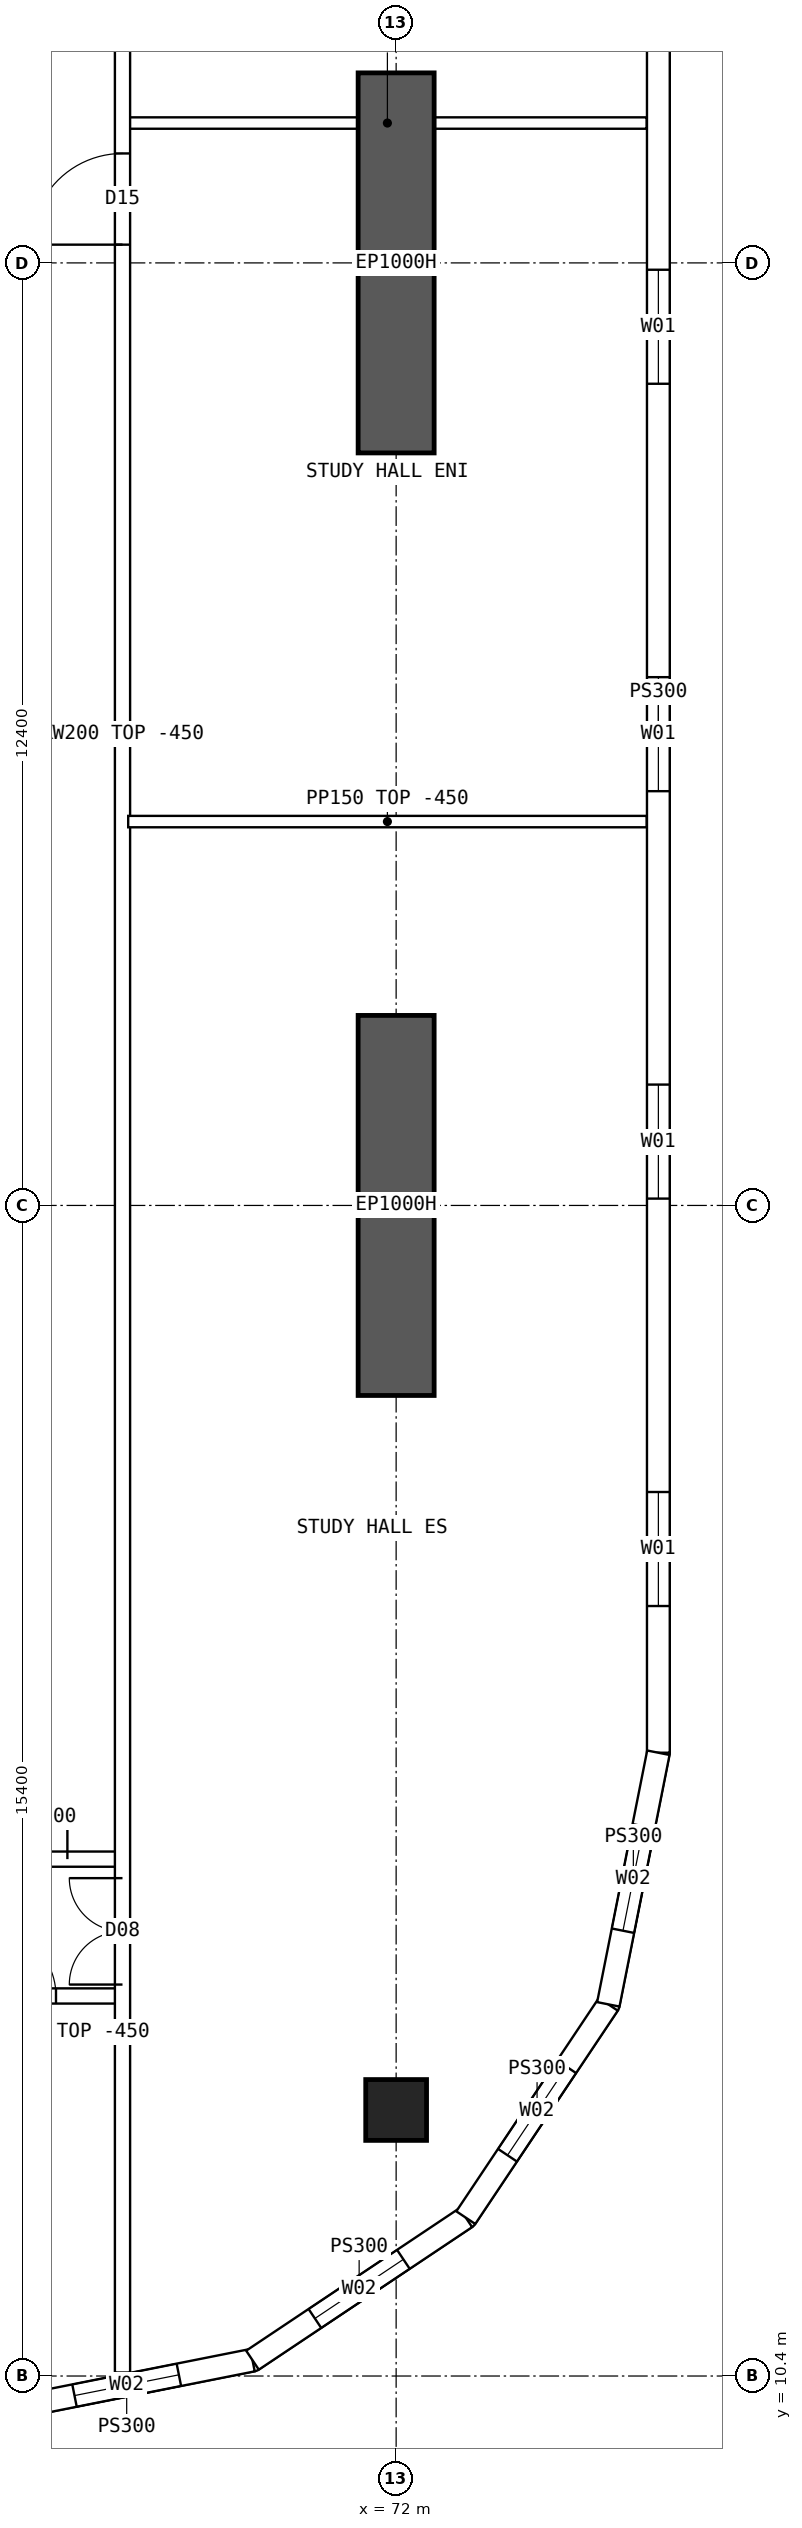
"""IFC4 building model, lengths in metres.
Left out: names, types, materials, properties, quantities, classifications, styles, units other than length and angle.
Written with IfcOpenShell. Run it as: python <this file> out.ifc"""

import sys

from ifc_helpers import new_model, si_unit, direction, frame, frame_2d, origin, origin_2d, place, context, subcontext, project, spatial, polyline, rectangle, hollow_rectangle, outline, extrude, element, fill, save


model = new_model("IFC4")
c1 = context("Model", 3, precision=1e-05, world=origin(), true_north=direction((0.0, 1.0)))
c2 = subcontext(c1, "Body", "Model", "MODEL_VIEW")
j1 = project(units=[si_unit("LENGTHUNIT", "METRE"), si_unit("PLANEANGLEUNIT", "RADIAN")], contexts=[c1])
p1 = place(None, origin())
s1 = spatial("IfcSite", under=j1, at=p1, CompositionType="ELEMENT")
p2 = place(p1, origin())
s2 = spatial("IfcBuilding", under=s1, at=p2, CompositionType="ELEMENT")
p3 = place(p2, frame((0.0, 0.0, 144.85)))
s3 = spatial("IfcBuildingStorey", under=s2, at=p3, CompositionType="ELEMENT", Elevation=144.85)
p4 = place(p3, frame((72.0, 13.9, 0.0), z_axis=(0.0, 0.0, 1.0), x_axis=(1.0, 0.0, 0.0)))
e1 = element("IfcColumn", 1, at=p4, inside=s3, PredefinedType="COLUMN", context=c2, shape_type="SweptSolid", body=[
    extrude(hollow_rectangle(XDim=0.8, YDim=0.8, WallThickness=0.08, at=origin_2d()), origin(), (0.0, 0.0, 1.0), 3.75),
])
for number, where, z_axis, x_axis in (
    (2, (72.0, 23.3, 0.0), (0.0, 0.0, 1.0), (0.0, 1.0, 0.0)),
    (3, (72.0, 35.7, 0.0), (0.0, 0.0, 1.0), (0.0, 1.0, 0.0)),
):
    element("IfcWall", number, at=place(p3, frame(where, z_axis=z_axis, x_axis=x_axis)), inside=s3, PredefinedType="SHEAR", context=c2, shape_type="SweptSolid", body=[
        extrude(rectangle(XDim=5.0, YDim=1.0, at=frame_2d((2.5, 0.0))), origin(), (0.0, 0.0, 1.0), 3.75),
    ])
p5 = place(p3, frame((75.45, 18.6, 0.0), z_axis=(0.0, 0.0, 1.0), x_axis=(0.0, 1.0, 0.0)))
e4 = element("IfcWall", 4, at=p5, inside=s3, PredefinedType="SOLIDWALL", context=c2, shape_type="SweptSolid", body=[
    extrude(outline(polyline([(-0.015, -0.15), (26.815, -0.15), (26.785, 0.15), (0.015, 0.15), (-0.015, -0.15)])), origin(), (0.0, 0.0, 1.0), 3.3),
])
p6 = place(p5, frame((1.93, 0.0, 0.9)))
e5 = element("IfcOpeningElement", 5, at=p6, cuts=e4, PredefinedType="OPENING", context=c2, shape_type="SweptSolid", body=[
    extrude(rectangle(XDim=1.5, YDim=2.0, at=frame_2d((0.75, 1.0))), frame((0.0, 0.16, 0.0), z_axis=(0.0, -1.0, 0.0), x_axis=(1.0, 0.0, 0.0)), (0.0, 0.0, 1.0), 0.32),
])
p7 = place(p5, frame((7.29, 0.0, 0.9)))
e6 = element("IfcOpeningElement", 6, at=p7, cuts=e4, PredefinedType="OPENING", context=c2, shape_type="SweptSolid", body=[
    extrude(rectangle(XDim=1.5, YDim=2.0, at=frame_2d((0.75, 1.0))), frame((0.0, 0.16, 0.0), z_axis=(0.0, -1.0, 0.0), x_axis=(1.0, 0.0, 0.0)), (0.0, 0.0, 1.0), 0.32),
])
p8 = place(p5, frame((12.65, 0.0, 0.9)))
e7 = element("IfcOpeningElement", 7, at=p8, cuts=e4, PredefinedType="OPENING", context=c2, shape_type="SweptSolid", body=[
    extrude(rectangle(XDim=1.5, YDim=2.0, at=frame_2d((0.75, 1.0))), frame((0.0, 0.16, 0.0), z_axis=(0.0, -1.0, 0.0), x_axis=(1.0, 0.0, 0.0)), (0.0, 0.0, 1.0), 0.32),
])
p9 = place(p5, frame((18.01, 0.0, 0.9)))
e8 = element("IfcOpeningElement", 8, at=p9, cuts=e4, PredefinedType="OPENING", context=c2, shape_type="SweptSolid", body=[
    extrude(rectangle(XDim=1.5, YDim=2.0, at=frame_2d((0.75, 1.0))), frame((0.0, 0.16, 0.0), z_axis=(0.0, -1.0, 0.0), x_axis=(1.0, 0.0, 0.0)), (0.0, 0.0, 1.0), 0.32),
])
p10 = place(p5, frame((23.37, 0.0, 0.9)))
e9 = element("IfcOpeningElement", 9, at=p10, cuts=e4, PredefinedType="OPENING", context=c2, shape_type="SweptSolid", body=[
    extrude(rectangle(XDim=1.5, YDim=2.0, at=frame_2d((0.75, 1.0))), frame((0.0, 0.16, 0.0), z_axis=(0.0, -1.0, 0.0), x_axis=(1.0, 0.0, 0.0)), (0.0, 0.0, 1.0), 0.32),
])
p11 = place(p3, frame((66.8, 9.95, 0.0), z_axis=(0.0, 0.0, 1.0), x_axis=(0.98078325777, 0.195100490205, 0.0)))
e10 = element("IfcWall", 10, at=p11, inside=s3, PredefinedType="SOLIDWALL", context=c2, shape_type="SweptSolid", body=[
    extrude(outline(polyline([(-0.03, -0.15), (3.405, -0.15), (3.345, 0.15), (0.03, 0.15), (-0.03, -0.15)])), origin(), (0.0, 0.0, 1.0), 3.3),
])
p12 = place(p11, frame((0.988, 0.0, 0.9)))
e11 = element("IfcOpeningElement", 11, at=p12, cuts=e10, PredefinedType="OPENING", context=c2, shape_type="SweptSolid", body=[
    extrude(rectangle(XDim=1.4, YDim=1.8, at=frame_2d((0.7, 0.9))), frame((0.0, 0.16, 0.0), z_axis=(0.0, -1.0, 0.0), x_axis=(1.0, 0.0, 0.0)), (0.0, 0.0, 1.0), 0.32),
])
p13 = place(p3, frame((70.11, 10.608, 0.0), z_axis=(0.0, 0.0, 1.0), x_axis=(0.831493450887, 0.555534554399, 0.0)))
e12 = element("IfcWall", 12, at=p13, inside=s3, PredefinedType="SOLIDWALL", context=c2, shape_type="SweptSolid", body=[
    extrude(outline(polyline([(-0.03, -0.15), (3.405, -0.15), (3.345, 0.15), (0.03, 0.15), (-0.03, -0.15)])), origin(), (0.0, 0.0, 1.0), 3.3),
])
p14 = place(p13, frame((0.988, 0.0, 0.9)))
e13 = element("IfcOpeningElement", 13, at=p14, cuts=e12, PredefinedType="OPENING", context=c2, shape_type="SweptSolid", body=[
    extrude(rectangle(XDim=1.4, YDim=1.8, at=frame_2d((0.7, 0.9))), frame((0.0, 0.16, 0.0), z_axis=(0.0, -1.0, 0.0), x_axis=(1.0, 0.0, 0.0)), (0.0, 0.0, 1.0), 0.32),
])
p15 = place(p3, frame((72.917, 12.483, 0.0), z_axis=(0.0, 0.0, 1.0), x_axis=(0.555534554399, 0.831493450887, 0.0)))
e14 = element("IfcWall", 14, at=p15, inside=s3, PredefinedType="SOLIDWALL", context=c2, shape_type="SweptSolid", body=[
    extrude(outline(polyline([(-0.03, -0.15), (3.405, -0.15), (3.345, 0.15), (0.03, 0.15), (-0.03, -0.15)])), origin(), (0.0, 0.0, 1.0), 3.3),
])
p16 = place(p15, frame((0.988, 0.0, 0.9)))
e15 = element("IfcOpeningElement", 15, at=p16, cuts=e14, PredefinedType="OPENING", context=c2, shape_type="SweptSolid", body=[
    extrude(rectangle(XDim=1.4, YDim=1.8, at=frame_2d((0.7, 0.9))), frame((0.0, 0.16, 0.0), z_axis=(0.0, -1.0, 0.0), x_axis=(1.0, 0.0, 0.0)), (0.0, 0.0, 1.0), 0.32),
])
p17 = place(p3, frame((74.792, 15.29, 0.0), z_axis=(0.0, 0.0, 1.0), x_axis=(0.19508664885, 0.980786011034, 0.0)))
e16 = element("IfcWall", 16, at=p17, inside=s3, PredefinedType="SOLIDWALL", context=c2, shape_type="SweptSolid", body=[
    extrude(outline(polyline([(-0.03, -0.15), (3.39, -0.15), (3.36, 0.15), (0.03, 0.15), (-0.03, -0.15)])), origin(), (0.0, 0.0, 1.0), 3.3),
])
p18 = place(p17, frame((0.988, 0.0, 0.9)))
e17 = element("IfcOpeningElement", 17, at=p18, cuts=e16, PredefinedType="OPENING", context=c2, shape_type="SweptSolid", body=[
    extrude(rectangle(XDim=1.4, YDim=1.8, at=frame_2d((0.7, 0.9))), frame((0.0, 0.16, 0.0), z_axis=(0.0, -1.0, 0.0), x_axis=(1.0, 0.0, 0.0)), (0.0, 0.0, 1.0), 0.32),
])
p19 = place(p3, frame((66.425, 15.4, 0.0), z_axis=(0.0, 0.0, 1.0), x_axis=(1.0, 0.0, 0.0)))
e18 = element("IfcWall", 18, at=p19, inside=s3, PredefinedType="SOLIDWALL", context=c2, shape_type="SweptSolid", body=[
    extrude(rectangle(XDim=1.975, YDim=0.2, at=frame_2d((0.987, 0.0))), origin(), (0.0, 0.0, 1.0), 3.3),
])
p20 = place(p19, frame((0.2, 0.0, 0.0)))
e19 = element("IfcOpeningElement", 19, at=p20, cuts=e18, PredefinedType="OPENING", context=c2, shape_type="SweptSolid", body=[
    extrude(rectangle(XDim=0.9, YDim=2.1, at=frame_2d((0.45, 1.05))), frame((0.0, 0.11, 0.0), z_axis=(0.0, -1.0, 0.0), x_axis=(1.0, 0.0, 0.0)), (0.0, 0.0, 1.0), 0.22),
])
p21 = place(p3, frame((66.425, 17.2, 0.0), z_axis=(0.0, 0.0, 1.0), x_axis=(1.0, 0.0, 0.0)))
e20 = element("IfcWall", 20, at=p21, inside=s3, PredefinedType="SOLIDWALL", context=c2, shape_type="SweptSolid", body=[
    extrude(rectangle(XDim=1.975, YDim=0.2, at=frame_2d((0.987, 0.0))), origin(), (0.0, 0.0, 1.0), 3.3),
])
p22 = place(p21, frame((0.05, 0.0, 0.0)))
e21 = element("IfcOpeningElement", 21, at=p22, cuts=e20, PredefinedType="OPENING", context=c2, shape_type="SweptSolid", body=[
    extrude(rectangle(XDim=1.2, YDim=2.1, at=frame_2d((0.6, 1.05))), frame((0.0, 0.11, 0.0), z_axis=(0.0, -1.0, 0.0), x_axis=(1.0, 0.0, 0.0)), (0.0, 0.0, 1.0), 0.22),
])
p23 = place(p3, frame((68.475, 30.85, 0.0), z_axis=(0.0, 0.0, 1.0), x_axis=(1.0, 0.0, 0.0)))
e22 = element("IfcWall", 22, at=p23, inside=s3, PredefinedType="PARTITIONING", context=c2, shape_type="SweptSolid", body=[
    extrude(outline(polyline([(0.0, 0.0), (6.82, 0.0), (6.82, 3.3), (3.827, 3.3), (3.825, 2.85), (3.227, 2.85), (3.225, 3.3), (0.0, 3.3), (0.0, 0.0)])), frame((0.0, 0.075, 0.0), z_axis=(0.0, -1.0, 0.0), x_axis=(1.0, 0.0, 0.0)), (0.0, 0.0, 1.0), 0.15),
])
p24 = place(p3, frame((68.4, 10.446, 0.0), z_axis=(0.0, 0.0, 1.0), x_axis=(0.0, 1.0, 0.0)))
e23 = element("IfcWall", 23, at=p24, inside=s3, PredefinedType="SOLIDWALL", context=c2, shape_type="SweptSolid", body=[
    extrude(rectangle(XDim=43.107, YDim=0.2, at=frame_2d((21.554, 0.0))), origin(), (0.0, 0.0, 1.0), 3.3),
])
p25 = place(p24, frame((27.994, 0.0, 0.0)))
e24 = element("IfcOpeningElement", 24, at=p25, cuts=e23, PredefinedType="OPENING", context=c2, shape_type="SweptSolid", body=[
    extrude(rectangle(XDim=1.2, YDim=2.1, at=frame_2d((0.6, 1.05))), frame((0.0, 0.11, 0.0), z_axis=(0.0, -1.0, 0.0), x_axis=(1.0, 0.0, 0.0)), (0.0, 0.0, 1.0), 0.22),
])
p26 = place(p24, frame((5.104, 0.0, 0.0)))
e25 = element("IfcOpeningElement", 25, at=p26, cuts=e23, PredefinedType="OPENING", context=c2, shape_type="SweptSolid", body=[
    extrude(rectangle(XDim=1.4, YDim=2.1, at=frame_2d((0.7, 1.05))), frame((0.0, 0.11, 0.0), z_axis=(0.0, -1.0, 0.0), x_axis=(1.0, 0.0, 0.0)), (0.0, 0.0, 1.0), 0.22),
])
p27 = place(p24, frame((36.504, 0.0, 0.0)))
e26 = element("IfcOpeningElement", 26, at=p27, cuts=e23, PredefinedType="OPENING", context=c2, shape_type="SweptSolid", body=[
    extrude(rectangle(XDim=1.4, YDim=2.1, at=frame_2d((0.7, 1.05))), frame((0.0, 0.11, 0.0), z_axis=(0.0, -1.0, 0.0), x_axis=(1.0, 0.0, 0.0)), (0.0, 0.0, 1.0), 0.22),
])
p28 = place(p3, frame((68.475, 40.04, 0.0), z_axis=(0.0, 0.0, 1.0), x_axis=(1.0, 0.0, 0.0)))
e27 = element("IfcWall", 27, at=p28, inside=s3, PredefinedType="PARTITIONING", context=c2, shape_type="SweptSolid", body=[
    extrude(rectangle(XDim=6.82, YDim=0.15, at=frame_2d((3.41, 0.0))), origin(), (0.0, 0.0, 1.0), 3.3),
])
p29 = place(p6, origin())
e28 = element("IfcWindow", 28, at=p29, inside=s3, PartitioningType="SINGLE_PANEL", PredefinedType="WINDOW", context=c2, shape_type="SweptSolid", body=[
    extrude(rectangle(XDim=1.5, YDim=2.0, at=frame_2d((0.75, 1.0))), frame((0.0, 0.03, 0.0), z_axis=(0.0, -1.0, 0.0), x_axis=(1.0, 0.0, 0.0)), (0.0, 0.0, 1.0), 0.06),
])
fill(e5, e28)
p30 = place(p7, origin())
e29 = element("IfcWindow", 29, at=p30, inside=s3, PartitioningType="SINGLE_PANEL", PredefinedType="WINDOW", context=c2, shape_type="SweptSolid", body=[
    extrude(rectangle(XDim=1.5, YDim=2.0, at=frame_2d((0.75, 1.0))), frame((0.0, 0.03, 0.0), z_axis=(0.0, -1.0, 0.0), x_axis=(1.0, 0.0, 0.0)), (0.0, 0.0, 1.0), 0.06),
])
fill(e6, e29)
p31 = place(p8, origin())
e30 = element("IfcWindow", 30, at=p31, inside=s3, PartitioningType="SINGLE_PANEL", PredefinedType="WINDOW", context=c2, shape_type="SweptSolid", body=[
    extrude(rectangle(XDim=1.5, YDim=2.0, at=frame_2d((0.75, 1.0))), frame((0.0, 0.03, 0.0), z_axis=(0.0, -1.0, 0.0), x_axis=(1.0, 0.0, 0.0)), (0.0, 0.0, 1.0), 0.06),
])
fill(e7, e30)
p32 = place(p9, origin())
e31 = element("IfcWindow", 31, at=p32, inside=s3, PartitioningType="SINGLE_PANEL", PredefinedType="WINDOW", context=c2, shape_type="SweptSolid", body=[
    extrude(rectangle(XDim=1.5, YDim=2.0, at=frame_2d((0.75, 1.0))), frame((0.0, 0.03, 0.0), z_axis=(0.0, -1.0, 0.0), x_axis=(1.0, 0.0, 0.0)), (0.0, 0.0, 1.0), 0.06),
])
fill(e8, e31)
p33 = place(p12, origin())
e32 = element("IfcWindow", 32, at=p33, inside=s3, PartitioningType="SINGLE_PANEL", PredefinedType="WINDOW", context=c2, shape_type="SweptSolid", body=[
    extrude(rectangle(XDim=1.4, YDim=1.8, at=frame_2d((0.7, 0.9))), frame((0.0, 0.03, 0.0), z_axis=(0.0, -1.0, 0.0), x_axis=(1.0, 0.0, 0.0)), (0.0, 0.0, 1.0), 0.06),
])
fill(e11, e32)
p34 = place(p14, origin())
e33 = element("IfcWindow", 33, at=p34, inside=s3, PartitioningType="SINGLE_PANEL", PredefinedType="WINDOW", context=c2, shape_type="SweptSolid", body=[
    extrude(rectangle(XDim=1.4, YDim=1.8, at=frame_2d((0.7, 0.9))), frame((0.0, 0.03, 0.0), z_axis=(0.0, -1.0, 0.0), x_axis=(1.0, 0.0, 0.0)), (0.0, 0.0, 1.0), 0.06),
])
fill(e13, e33)
p35 = place(p16, origin())
e34 = element("IfcWindow", 34, at=p35, inside=s3, PartitioningType="SINGLE_PANEL", PredefinedType="WINDOW", context=c2, shape_type="SweptSolid", body=[
    extrude(rectangle(XDim=1.4, YDim=1.8, at=frame_2d((0.7, 0.9))), frame((0.0, 0.03, 0.0), z_axis=(0.0, -1.0, 0.0), x_axis=(1.0, 0.0, 0.0)), (0.0, 0.0, 1.0), 0.06),
])
fill(e15, e34)
p36 = place(p18, origin())
e35 = element("IfcWindow", 35, at=p36, inside=s3, PartitioningType="SINGLE_PANEL", PredefinedType="WINDOW", context=c2, shape_type="SweptSolid", body=[
    extrude(rectangle(XDim=1.4, YDim=1.8, at=frame_2d((0.7, 0.9))), frame((0.0, 0.03, 0.0), z_axis=(0.0, -1.0, 0.0), x_axis=(1.0, 0.0, 0.0)), (0.0, 0.0, 1.0), 0.06),
])
fill(e17, e35)
p37 = place(p22, origin())
e36 = element("IfcDoor", 36, at=p37, inside=s3, OperationType="DOUBLE_DOOR_SINGLE_SWING", PredefinedType="DOOR", context=c2, shape_type="SweptSolid", body=[
    extrude(rectangle(XDim=1.2, YDim=2.1, at=frame_2d((0.6, 1.05))), frame((0.0, 0.025, 0.0), z_axis=(0.0, -1.0, 0.0), x_axis=(1.0, 0.0, 0.0)), (0.0, 0.0, 1.0), 0.05),
])
fill(e21, e36)
p38 = place(p25, origin())
e37 = element("IfcDoor", 37, at=p38, inside=s3, OperationType="SINGLE_SWING_LEFT", PredefinedType="DOOR", context=c2, shape_type="SweptSolid", body=[
    extrude(rectangle(XDim=1.2, YDim=2.1, at=frame_2d((0.6, 1.05))), frame((0.0, 0.025, 0.0), z_axis=(0.0, -1.0, 0.0), x_axis=(1.0, 0.0, 0.0)), (0.0, 0.0, 1.0), 0.05),
])
fill(e24, e37)
p39 = place(p26, origin())
e38 = element("IfcDoor", 38, at=p39, inside=s3, OperationType="DOUBLE_DOOR_SINGLE_SWING", PredefinedType="DOOR", context=c2, shape_type="SweptSolid", body=[
    extrude(rectangle(XDim=1.4, YDim=2.1, at=frame_2d((0.7, 1.05))), frame((0.0, 0.025, 0.0), z_axis=(0.0, -1.0, 0.0), x_axis=(1.0, 0.0, 0.0)), (0.0, 0.0, 1.0), 0.05),
])
fill(e25, e38)
p40 = place(p20, origin())
e39 = element("IfcDoor", 39, at=p40, inside=s3, OperationType="SINGLE_SWING_LEFT", PredefinedType="DOOR", context=c2, shape_type="SweptSolid", body=[
    extrude(rectangle(XDim=0.9, YDim=2.1, at=frame_2d((0.45, 1.05))), frame((0.0, 0.025, 0.0), z_axis=(0.0, -1.0, 0.0), x_axis=(1.0, 0.0, 0.0)), (0.0, 0.0, 1.0), 0.05),
])
fill(e19, e39)
save(model, sys.argv[1])
